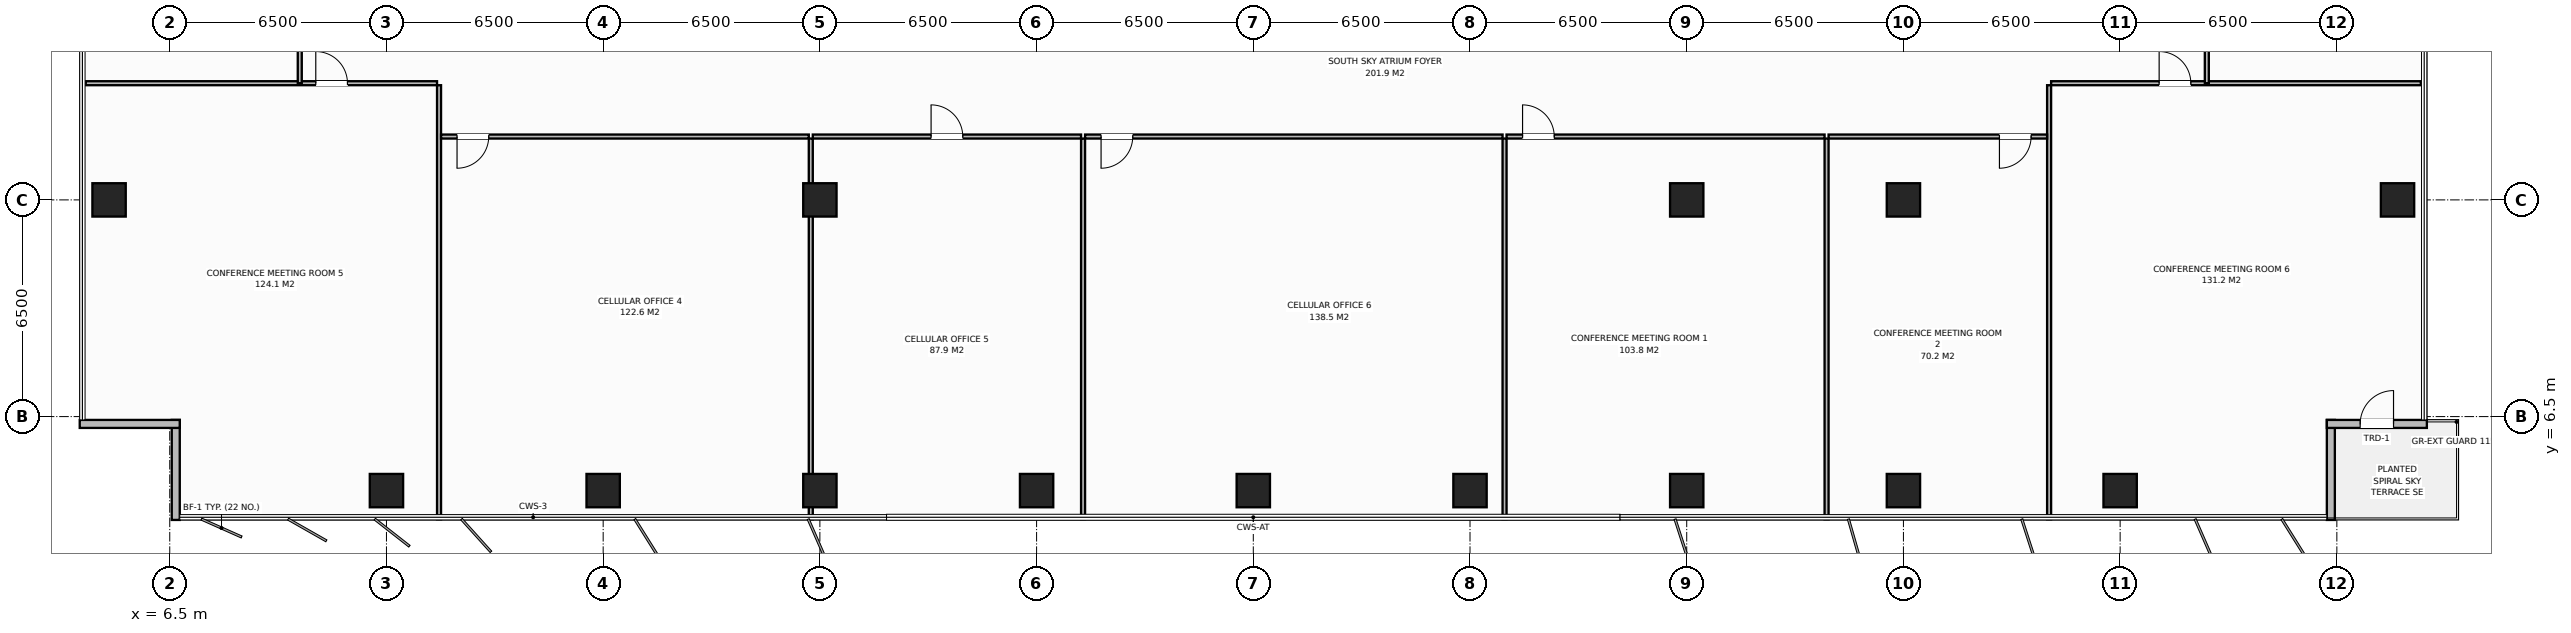
"""IFC4 building model, lengths in metres.
Left out: names, types, materials, properties, quantities, classifications, styles, units other than length and angle.
Written with IfcOpenShell. Run it as: python <this file> out.ifc"""

import sys

from ifc_helpers import new_model, si_unit, direction, frame, frame_2d, origin, origin_2d, place, context, subcontext, project, spatial, rectangle, extrude, element, fill, save


model = new_model("IFC4")
c1 = context("Model", 3, precision=1e-05, world=origin(), true_north=direction((0.0, 1.0)))
c2 = subcontext(c1, "Body", "Model", "MODEL_VIEW")
j1 = project(units=[si_unit("LENGTHUNIT", "METRE"), si_unit("PLANEANGLEUNIT", "RADIAN")], contexts=[c1])
p1 = place(None, origin())
s1 = spatial("IfcSite", under=j1, at=p1, CompositionType="ELEMENT")
p2 = place(p1, origin())
s2 = spatial("IfcBuilding", under=s1, at=p2, CompositionType="ELEMENT")
p3 = place(p2, frame((0.0, 0.0, 186.0)))
s3 = spatial("IfcBuildingStorey", under=s2, at=p3, CompositionType="ELEMENT", Elevation=186.0)
for number, where, z_axis, x_axis in (
    (1, (58.5, 13.0, 0.0), (0.0, 0.0, 1.0), (1.0, 0.0, 0.0)),
    (2, (26.0, 13.0, 0.0), (0.0, 0.0, 1.0), (1.0, 0.0, 0.0)),
    (3, (52.0, 13.0, 0.0), (0.0, 0.0, 1.0), (1.0, 0.0, 0.0)),
    (4, (13.0, 4.28, 0.0), (0.0, 0.0, 1.0), (1.0, 0.0, 0.0)),
    (5, (19.5, 4.28, 0.0), (0.0, 0.0, 1.0), (1.0, 0.0, 0.0)),
    (6, (26.0, 4.28, 0.0), (0.0, 0.0, 1.0), (1.0, 0.0, 0.0)),
    (7, (32.5, 4.28, 0.0), (0.0, 0.0, 1.0), (1.0, 0.0, 0.0)),
    (8, (39.0, 4.28, 0.0), (0.0, 0.0, 1.0), (1.0, 0.0, 0.0)),
    (9, (45.5, 4.28, 0.0), (0.0, 0.0, 1.0), (1.0, 0.0, 0.0)),
    (10, (52.0, 4.28, 0.0), (0.0, 0.0, 1.0), (1.0, 0.0, 0.0)),
    (11, (58.5, 4.28, 0.0), (0.0, 0.0, 1.0), (1.0, 0.0, 0.0)),
    (12, (65.0, 4.28, 0.0), (0.0, 0.0, 1.0), (1.0, 0.0, 0.0)),
    (13, (4.68, 13.0, 0.0), (0.0, 0.0, 1.0), (1.0, 0.0, 0.0)),
    (14, (73.32, 13.0, 0.0), (0.0, 0.0, 1.0), (1.0, 0.0, 0.0)),
):
    element("IfcColumn", number, at=place(p3, frame(where, z_axis=z_axis, x_axis=x_axis)), inside=s3, PredefinedType="COLUMN", context=c2, shape_type="SweptSolid", body=[
        extrude(rectangle(XDim=1.0, YDim=1.0, at=origin_2d()), origin(), (0.0, 0.0, 1.0), 3.8),
    ])
for number, where, z_axis, x_axis in (
    (15, (6.68, 3.4, 0.0), (0.0, 0.0, 1.0), (0.0, 1.0, 0.0)),
    (16, (6.8, 6.28, 0.0), (0.0, 0.0, 1.0), (-1.0, 0.0, 0.0)),
    (17, (71.32, 6.4, 0.0), (0.0, 0.0, 1.0), (0.0, -1.0, 0.0)),
):
    element("IfcWall", number, at=place(p3, frame(where, z_axis=z_axis, x_axis=x_axis)), inside=s3, PredefinedType="STANDARD", context=c2, shape_type="SweptSolid", body=[
        extrude(rectangle(XDim=3.0, YDim=0.24, at=frame_2d((1.5, 0.0))), origin(), (0.0, 0.0, 1.0), 3.572),
    ])
p4 = place(p3, frame((74.2, 6.28, 0.0), z_axis=(0.0, 0.0, 1.0), x_axis=(-1.0, 0.0, 0.0)))
e18 = element("IfcWall", 18, at=p4, inside=s3, PredefinedType="STANDARD", context=c2, shape_type="SweptSolid", body=[
    extrude(rectangle(XDim=3.0, YDim=0.24, at=frame_2d((1.5, 0.0))), origin(), (0.0, 0.0, 1.0), 3.572),
])
p5 = place(p4, frame((1.0, 0.0, 0.0)))
e19 = element("IfcOpeningElement", 19, at=p5, cuts=e18, PredefinedType="OPENING", context=c2, shape_type="SweptSolid", body=[
    extrude(rectangle(XDim=1.0, YDim=2.2, at=frame_2d((0.5, 1.1))), frame((0.0, 0.13, 0.0), z_axis=(0.0, -1.0, 0.0), x_axis=(1.0, 0.0, 0.0)), (0.0, 0.0, 1.0), 0.26),
])
p6 = place(p3, frame((14.577, 3.42, 0.0), z_axis=(0.0, 0.0, 1.0), x_axis=(0.0, 1.0, 0.0)))
e20 = element("IfcWall", 20, at=p6, inside=s3, PredefinedType="PARTITIONING", context=c2, shape_type="SweptSolid", body=[
    extrude(rectangle(XDim=13.02, YDim=0.12, at=frame_2d((6.51, 0.0))), origin(), (0.0, 0.0, 1.0), 3.572),
])
p7 = place(p3, frame((3.98, 16.5, 0.0), z_axis=(0.0, 0.0, 1.0), x_axis=(1.0, 0.0, 0.0)))
e21 = element("IfcWall", 21, at=p7, inside=s3, PredefinedType="PARTITIONING", context=c2, shape_type="SweptSolid", body=[
    extrude(rectangle(XDim=10.537, YDim=0.12, at=frame_2d((5.269, 0.0))), origin(), (0.0, 0.0, 1.0), 3.572),
])
p8 = place(p7, frame((6.9, 0.0, 0.0)))
e22 = element("IfcOpeningElement", 22, at=p8, cuts=e21, PredefinedType="OPENING", context=c2, shape_type="SweptSolid", body=[
    extrude(rectangle(XDim=0.95, YDim=2.15, at=frame_2d((0.475, 1.075))), frame((0.0, 0.07, 0.0), z_axis=(0.0, -1.0, 0.0), x_axis=(1.0, 0.0, 0.0)), (0.0, 0.0, 1.0), 0.14),
])
p9 = place(p3, frame((25.727, 3.42, 0.0), z_axis=(0.0, 0.0, 1.0), x_axis=(0.0, 1.0, 0.0)))
e23 = element("IfcWall", 23, at=p9, inside=s3, PredefinedType="PARTITIONING", context=c2, shape_type="SweptSolid", body=[
    extrude(rectangle(XDim=11.42, YDim=0.12, at=frame_2d((5.71, 0.0))), origin(), (0.0, 0.0, 1.0), 3.572),
])
p10 = place(p3, frame((14.637, 14.9, 0.0), z_axis=(0.0, 0.0, 1.0), x_axis=(1.0, 0.0, 0.0)))
e24 = element("IfcWall", 24, at=p10, inside=s3, PredefinedType="PARTITIONING", context=c2, shape_type="SweptSolid", body=[
    extrude(rectangle(XDim=11.03, YDim=0.12, at=frame_2d((5.515, 0.0))), origin(), (0.0, 0.0, 1.0), 3.572),
])
p11 = place(p10, frame((0.48, 0.0, 0.0)))
e25 = element("IfcOpeningElement", 25, at=p11, cuts=e24, PredefinedType="OPENING", context=c2, shape_type="SweptSolid", body=[
    extrude(rectangle(XDim=0.95, YDim=2.15, at=frame_2d((0.475, 1.075))), frame((0.0, 0.07, 0.0), z_axis=(0.0, -1.0, 0.0), x_axis=(1.0, 0.0, 0.0)), (0.0, 0.0, 1.0), 0.14),
])
p12 = place(p3, frame((33.894, 3.42, 0.0), z_axis=(0.0, 0.0, 1.0), x_axis=(0.0, 1.0, 0.0)))
e26 = element("IfcWall", 26, at=p12, inside=s3, PredefinedType="PARTITIONING", context=c2, shape_type="SweptSolid", body=[
    extrude(rectangle(XDim=11.42, YDim=0.12, at=frame_2d((5.71, 0.0))), origin(), (0.0, 0.0, 1.0), 3.572),
])
p13 = place(p3, frame((25.787, 14.9, 0.0), z_axis=(0.0, 0.0, 1.0), x_axis=(1.0, 0.0, 0.0)))
e27 = element("IfcWall", 27, at=p13, inside=s3, PredefinedType="PARTITIONING", context=c2, shape_type="SweptSolid", body=[
    extrude(rectangle(XDim=8.047, YDim=0.12, at=frame_2d((4.023, 0.0))), origin(), (0.0, 0.0, 1.0), 3.572),
])
p14 = place(p13, frame((3.548, 0.0, 0.0)))
e28 = element("IfcOpeningElement", 28, at=p14, cuts=e27, PredefinedType="OPENING", context=c2, shape_type="SweptSolid", body=[
    extrude(rectangle(XDim=0.95, YDim=2.15, at=frame_2d((0.475, 1.075))), frame((0.0, 0.07, 0.0), z_axis=(0.0, -1.0, 0.0), x_axis=(1.0, 0.0, 0.0)), (0.0, 0.0, 1.0), 0.14),
])
p15 = place(p3, frame((46.536, 3.42, 0.0), z_axis=(0.0, 0.0, 1.0), x_axis=(0.0, 1.0, 0.0)))
e29 = element("IfcWall", 29, at=p15, inside=s3, PredefinedType="PARTITIONING", context=c2, shape_type="SweptSolid", body=[
    extrude(rectangle(XDim=11.42, YDim=0.12, at=frame_2d((5.71, 0.0))), origin(), (0.0, 0.0, 1.0), 3.572),
])
p16 = place(p3, frame((33.954, 14.9, 0.0), z_axis=(0.0, 0.0, 1.0), x_axis=(1.0, 0.0, 0.0)))
e30 = element("IfcWall", 30, at=p16, inside=s3, PredefinedType="PARTITIONING", context=c2, shape_type="SweptSolid", body=[
    extrude(rectangle(XDim=12.522, YDim=0.12, at=frame_2d((6.261, 0.0))), origin(), (0.0, 0.0, 1.0), 3.572),
])
p17 = place(p16, frame((0.48, 0.0, 0.0)))
e31 = element("IfcOpeningElement", 31, at=p17, cuts=e30, PredefinedType="OPENING", context=c2, shape_type="SweptSolid", body=[
    extrude(rectangle(XDim=0.95, YDim=2.15, at=frame_2d((0.475, 1.075))), frame((0.0, 0.07, 0.0), z_axis=(0.0, -1.0, 0.0), x_axis=(1.0, 0.0, 0.0)), (0.0, 0.0, 1.0), 0.14),
])
p18 = place(p3, frame((56.195, 3.42, 0.0), z_axis=(0.0, 0.0, 1.0), x_axis=(0.0, 1.0, 0.0)))
e32 = element("IfcWall", 32, at=p18, inside=s3, PredefinedType="PARTITIONING", context=c2, shape_type="SweptSolid", body=[
    extrude(rectangle(XDim=11.42, YDim=0.12, at=frame_2d((5.71, 0.0))), origin(), (0.0, 0.0, 1.0), 3.572),
])
p19 = place(p3, frame((46.596, 14.9, 0.0), z_axis=(0.0, 0.0, 1.0), x_axis=(1.0, 0.0, 0.0)))
e33 = element("IfcWall", 33, at=p19, inside=s3, PredefinedType="PARTITIONING", context=c2, shape_type="SweptSolid", body=[
    extrude(rectangle(XDim=9.539, YDim=0.12, at=frame_2d((4.769, 0.0))), origin(), (0.0, 0.0, 1.0), 3.572),
])
p20 = place(p19, frame((0.48, 0.0, 0.0)))
e34 = element("IfcOpeningElement", 34, at=p20, cuts=e33, PredefinedType="OPENING", context=c2, shape_type="SweptSolid", body=[
    extrude(rectangle(XDim=0.95, YDim=2.15, at=frame_2d((0.475, 1.075))), frame((0.0, 0.07, 0.0), z_axis=(0.0, -1.0, 0.0), x_axis=(1.0, 0.0, 0.0)), (0.0, 0.0, 1.0), 0.14),
])
p21 = place(p3, frame((62.87, 3.42, 0.0), z_axis=(0.0, 0.0, 1.0), x_axis=(0.0, 1.0, 0.0)))
e35 = element("IfcWall", 35, at=p21, inside=s3, PredefinedType="PARTITIONING", context=c2, shape_type="SweptSolid", body=[
    extrude(rectangle(XDim=13.02, YDim=0.12, at=frame_2d((6.51, 0.0))), origin(), (0.0, 0.0, 1.0), 3.572),
])
p22 = place(p3, frame((56.255, 14.9, 0.0), z_axis=(0.0, 0.0, 1.0), x_axis=(1.0, 0.0, 0.0)))
e36 = element("IfcWall", 36, at=p22, inside=s3, PredefinedType="PARTITIONING", context=c2, shape_type="SweptSolid", body=[
    extrude(rectangle(XDim=6.555, YDim=0.12, at=frame_2d((3.277, 0.0))), origin(), (0.0, 0.0, 1.0), 3.572),
])
p23 = place(p22, frame((5.125, 0.0, 0.0)))
e37 = element("IfcOpeningElement", 37, at=p23, cuts=e36, PredefinedType="OPENING", context=c2, shape_type="SweptSolid", body=[
    extrude(rectangle(XDim=0.95, YDim=2.15, at=frame_2d((0.475, 1.075))), frame((0.0, 0.07, 0.0), z_axis=(0.0, -1.0, 0.0), x_axis=(1.0, 0.0, 0.0)), (0.0, 0.0, 1.0), 0.14),
])
p24 = place(p3, frame((62.93, 16.5, 0.0), z_axis=(0.0, 0.0, 1.0), x_axis=(1.0, 0.0, 0.0)))
e38 = element("IfcWall", 38, at=p24, inside=s3, PredefinedType="PARTITIONING", context=c2, shape_type="SweptSolid", body=[
    extrude(rectangle(XDim=11.09, YDim=0.12, at=frame_2d((5.545, 0.0))), origin(), (0.0, 0.0, 1.0), 3.572),
])
p25 = place(p24, frame((3.24, 0.0, 0.0)))
e39 = element("IfcOpeningElement", 39, at=p25, cuts=e38, PredefinedType="OPENING", context=c2, shape_type="SweptSolid", body=[
    extrude(rectangle(XDim=0.95, YDim=2.15, at=frame_2d((0.475, 1.075))), frame((0.0, 0.07, 0.0), z_axis=(0.0, -1.0, 0.0), x_axis=(1.0, 0.0, 0.0)), (0.0, 0.0, 1.0), 0.14),
])
p26 = place(p3, frame((10.4, 16.5, 0.0), z_axis=(0.0, 0.0, 1.0), x_axis=(0.0, 1.0, 0.0)))
e40 = element("IfcWall", 40, at=p26, inside=s3, PredefinedType="PARTITIONING", context=c2, shape_type="SweptSolid", body=[
    extrude(rectangle(XDim=6.333, YDim=0.12, at=frame_2d((3.167, 0.0))), origin(), (0.0, 0.0, 1.0), 3.572),
])
p27 = place(p26, frame((3.742, 0.0, 0.0)))
e41 = element("IfcOpeningElement", 41, at=p27, cuts=e40, PredefinedType="OPENING", context=c2, shape_type="SweptSolid", body=[
    extrude(rectangle(XDim=0.95, YDim=2.15, at=frame_2d((0.475, 1.075))), frame((0.0, 0.07, 0.0), z_axis=(0.0, -1.0, 0.0), x_axis=(1.0, 0.0, 0.0)), (0.0, 0.0, 1.0), 0.14),
])
p28 = place(p3, frame((67.6, 16.5, 0.0), z_axis=(0.0, 0.0, 1.0), x_axis=(0.0, 1.0, 0.0)))
e42 = element("IfcWall", 42, at=p28, inside=s3, PredefinedType="PARTITIONING", context=c2, shape_type="SweptSolid", body=[
    extrude(rectangle(XDim=16.9, YDim=0.12, at=frame_2d((8.45, 0.0))), origin(), (0.0, 0.0, 1.0), 3.572),
])
p29 = place(p28, frame((9.025, 0.0, 0.0)))
e43 = element("IfcOpeningElement", 43, at=p29, cuts=e42, PredefinedType="OPENING", context=c2, shape_type="SweptSolid", body=[
    extrude(rectangle(XDim=0.95, YDim=2.15, at=frame_2d((0.475, 1.075))), frame((0.0, 0.07, 0.0), z_axis=(0.0, -1.0, 0.0), x_axis=(1.0, 0.0, 0.0)), (0.0, 0.0, 1.0), 0.14),
])
p30 = place(p5, origin())
e44 = element("IfcDoor", 44, at=p30, inside=s3, OperationType="SINGLE_SWING_RIGHT", PredefinedType="DOOR", context=c2, shape_type="SweptSolid", body=[
    extrude(rectangle(XDim=1.0, YDim=2.2, at=frame_2d((0.5, 1.1))), frame((0.0, 0.025, 0.0), z_axis=(0.0, -1.0, 0.0), x_axis=(1.0, 0.0, 0.0)), (0.0, 0.0, 1.0), 0.05),
])
fill(e19, e44)
p31 = place(p8, origin())
e45 = element("IfcDoor", 45, at=p31, inside=s3, OperationType="SINGLE_SWING_LEFT", PredefinedType="DOOR", context=c2, shape_type="SweptSolid", body=[
    extrude(rectangle(XDim=0.95, YDim=2.15, at=frame_2d((0.475, 1.075))), frame((0.0, 0.025, 0.0), z_axis=(0.0, -1.0, 0.0), x_axis=(1.0, 0.0, 0.0)), (0.0, 0.0, 1.0), 0.05),
])
fill(e22, e45)
p32 = place(p11, origin())
e46 = element("IfcDoor", 46, at=p32, inside=s3, OperationType="SINGLE_SWING_RIGHT", PredefinedType="DOOR", context=c2, shape_type="SweptSolid", body=[
    extrude(rectangle(XDim=0.95, YDim=2.15, at=frame_2d((0.475, 1.075))), frame((0.0, 0.025, 0.0), z_axis=(0.0, -1.0, 0.0), x_axis=(1.0, 0.0, 0.0)), (0.0, 0.0, 1.0), 0.05),
])
fill(e25, e46)
p33 = place(p14, origin())
e47 = element("IfcDoor", 47, at=p33, inside=s3, OperationType="SINGLE_SWING_LEFT", PredefinedType="DOOR", context=c2, shape_type="SweptSolid", body=[
    extrude(rectangle(XDim=0.95, YDim=2.15, at=frame_2d((0.475, 1.075))), frame((0.0, 0.025, 0.0), z_axis=(0.0, -1.0, 0.0), x_axis=(1.0, 0.0, 0.0)), (0.0, 0.0, 1.0), 0.05),
])
fill(e28, e47)
p34 = place(p17, origin())
e48 = element("IfcDoor", 48, at=p34, inside=s3, OperationType="SINGLE_SWING_RIGHT", PredefinedType="DOOR", context=c2, shape_type="SweptSolid", body=[
    extrude(rectangle(XDim=0.95, YDim=2.15, at=frame_2d((0.475, 1.075))), frame((0.0, 0.025, 0.0), z_axis=(0.0, -1.0, 0.0), x_axis=(1.0, 0.0, 0.0)), (0.0, 0.0, 1.0), 0.05),
])
fill(e31, e48)
p35 = place(p20, origin())
e49 = element("IfcDoor", 49, at=p35, inside=s3, OperationType="SINGLE_SWING_LEFT", PredefinedType="DOOR", context=c2, shape_type="SweptSolid", body=[
    extrude(rectangle(XDim=0.95, YDim=2.15, at=frame_2d((0.475, 1.075))), frame((0.0, 0.025, 0.0), z_axis=(0.0, -1.0, 0.0), x_axis=(1.0, 0.0, 0.0)), (0.0, 0.0, 1.0), 0.05),
])
fill(e34, e49)
p36 = place(p23, origin())
e50 = element("IfcDoor", 50, at=p36, inside=s3, OperationType="SINGLE_SWING_RIGHT", PredefinedType="DOOR", context=c2, shape_type="SweptSolid", body=[
    extrude(rectangle(XDim=0.95, YDim=2.15, at=frame_2d((0.475, 1.075))), frame((0.0, 0.025, 0.0), z_axis=(0.0, -1.0, 0.0), x_axis=(1.0, 0.0, 0.0)), (0.0, 0.0, 1.0), 0.05),
])
fill(e37, e50)
p37 = place(p25, origin())
e51 = element("IfcDoor", 51, at=p37, inside=s3, OperationType="SINGLE_SWING_LEFT", PredefinedType="DOOR", context=c2, shape_type="SweptSolid", body=[
    extrude(rectangle(XDim=0.95, YDim=2.15, at=frame_2d((0.475, 1.075))), frame((0.0, 0.025, 0.0), z_axis=(0.0, -1.0, 0.0), x_axis=(1.0, 0.0, 0.0)), (0.0, 0.0, 1.0), 0.05),
])
fill(e39, e51)
save(model, sys.argv[1])
